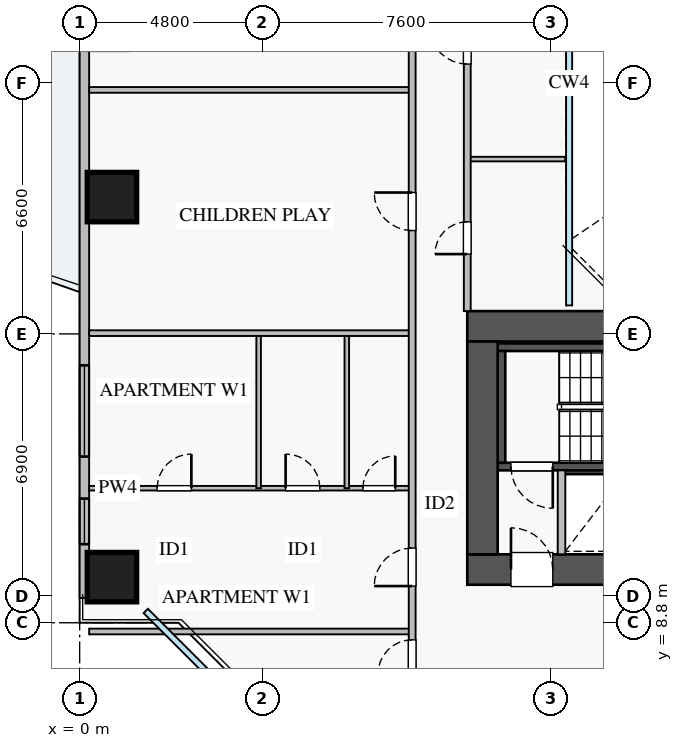
"""IFC4 building model, lengths in metres.
Left out: names, types, materials, properties, quantities, classifications, styles, units other than length and angle.
Written with IfcOpenShell. Run it as: python <this file> out.ifc"""

import sys

from ifc_helpers import new_model, si_unit, direction, frame, frame_2d, origin, origin_2d, place, context, subcontext, project, spatial, rectangle, extrude, source, transform, mapped, element, fill, save


model = new_model("IFC4")
c1 = context("Model", 3, precision=1e-05, world=origin(), true_north=direction((0.0, 1.0)))
c2 = subcontext(c1, "Body", "Model", "MODEL_VIEW")
j1 = project(units=[si_unit("LENGTHUNIT", "METRE"), si_unit("PLANEANGLEUNIT", "RADIAN")], contexts=[c1])
p1 = place(None, origin())
s1 = spatial("IfcSite", under=j1, at=p1, CompositionType="ELEMENT")
p2 = place(p1, origin())
s2 = spatial("IfcBuilding", under=s1, at=p2, CompositionType="ELEMENT")
p3 = place(p2, frame((0.0, 0.0, 66.5)))
s3 = spatial("IfcBuildingStorey", under=s2, at=p3, CompositionType="ELEMENT", Elevation=66.5)
p4 = place(p3, frame((12.68, 12.8, 0.0), z_axis=(0.0, 0.0, 1.0), x_axis=(1.0, 0.0, 0.0)))
e1 = element("IfcWall", 1, at=p4, inside=s3, PredefinedType="SHEAR", context=c2, shape_type="SweptSolid", body=[
    extrude(rectangle(XDim=1.94, YDim=0.18, at=frame_2d((0.97, 0.0))), origin(), (0.0, 0.0, 1.0), 3.07),
])
p5 = place(p3, frame((11.0, 12.91, 0.0), z_axis=(0.0, 0.0, 1.0), x_axis=(1.0, 0.0, 0.0)))
e2 = element("IfcWall", 2, at=p5, inside=s3, PredefinedType="SHEAR", context=c2, shape_type="SweptSolid", body=[
    extrude(rectangle(XDim=7.15, YDim=0.2, at=frame_2d((3.575, 0.0))), origin(), (0.0, 0.0, 1.0), 3.25),
])
p6 = place(p5, frame((0.35, 0.0, 0.0)))
e3 = element("IfcOpeningElement", 3, at=p6, cuts=e2, PredefinedType="OPENING", context=c2, shape_type="SweptSolid", body=[
    extrude(rectangle(XDim=1.1, YDim=2.05, at=frame_2d((0.55, 1.025))), frame((0.0, 0.11, 0.0), z_axis=(0.0, -1.0, 0.0), x_axis=(1.0, 0.0, 0.0)), (0.0, 0.0, 1.0), 0.22),
])
p7 = place(p3, frame((11.0, 16.05, 0.0), z_axis=(0.0, 0.0, 1.0), x_axis=(1.0, 0.0, 0.0)))
e4 = element("IfcWall", 4, at=p7, inside=s3, PredefinedType="SHEAR", context=c2, shape_type="SweptSolid", body=[
    extrude(rectangle(XDim=7.15, YDim=0.2, at=frame_2d((3.575, 0.0))), origin(), (0.0, 0.0, 1.0), 3.25),
])
p8 = place(p3, frame((11.1, 13.01, 0.0), z_axis=(0.0, 0.0, 1.0), x_axis=(0.0, 1.0, 0.0)))
e5 = element("IfcWall", 5, at=p8, inside=s3, PredefinedType="SHEAR", context=c2, shape_type="SweptSolid", body=[
    extrude(rectangle(XDim=2.94, YDim=0.2, at=frame_2d((1.47, 0.0))), origin(), (0.0, 0.0, 1.0), 3.25),
])
p9 = place(p3, frame((10.2, 10.2, 0.0), z_axis=(0.0, 0.0, 1.0), x_axis=(1.0, 0.0, 0.0)))
e6 = element("IfcWall", 6, at=p9, inside=s3, PredefinedType="SHEAR", context=c2, shape_type="SweptSolid", body=[
    extrude(rectangle(XDim=17.6, YDim=0.8, at=frame_2d((8.8, 0.0))), origin(), (0.0, 0.0, 1.0), 3.25),
])
p10 = place(p9, frame((1.15, 0.0, 0.0)))
e7 = element("IfcOpeningElement", 7, at=p10, cuts=e6, PredefinedType="OPENING", context=c2, shape_type="SweptSolid", body=[
    extrude(rectangle(XDim=1.1, YDim=2.05, at=frame_2d((0.55, 1.025))), frame((0.0, 0.41, 0.0), z_axis=(0.0, -1.0, 0.0), x_axis=(1.0, 0.0, 0.0)), (0.0, 0.0, 1.0), 0.82),
])
p11 = place(p9, frame((8.3, 0.0, 0.0)))
e8 = element("IfcOpeningElement", 8, at=p11, cuts=e6, PredefinedType="OPENING", context=c2, shape_type="SweptSolid", body=[
    extrude(rectangle(XDim=1.1, YDim=2.05, at=frame_2d((0.55, 1.025))), frame((0.0, 0.41, 0.0), z_axis=(0.0, -1.0, 0.0), x_axis=(1.0, 0.0, 0.0)), (0.0, 0.0, 1.0), 0.82),
])
p12 = place(p9, frame((10.05, 0.0, 0.0)))
e9 = element("IfcOpeningElement", 9, at=p12, cuts=e6, PredefinedType="OPENING", context=c2, shape_type="SweptSolid", body=[
    extrude(rectangle(XDim=1.1, YDim=2.05, at=frame_2d((0.55, 1.025))), frame((0.0, 0.41, 0.0), z_axis=(0.0, -1.0, 0.0), x_axis=(1.0, 0.0, 0.0)), (0.0, 0.0, 1.0), 0.82),
])
p13 = place(p9, frame((14.74, 0.0, 0.0)))
e10 = element("IfcOpeningElement", 10, at=p13, cuts=e6, PredefinedType="OPENING", context=c2, shape_type="SweptSolid", body=[
    extrude(rectangle(XDim=1.0, YDim=2.05, at=frame_2d((0.5, 1.025))), frame((0.0, 0.41, 0.0), z_axis=(0.0, -1.0, 0.0), x_axis=(1.0, 0.0, 0.0)), (0.0, 0.0, 1.0), 0.82),
])
p14 = place(p9, frame((11.945, 0.0, 0.0)))
e11 = element("IfcOpeningElement", 11, at=p14, cuts=e6, PredefinedType="OPENING", context=c2, shape_type="SweptSolid", body=[
    extrude(rectangle(XDim=1.0, YDim=2.05, at=frame_2d((0.5, 1.025))), frame((0.0, 0.41, 0.0), z_axis=(0.0, -1.0, 0.0), x_axis=(1.0, 0.0, 0.0)), (0.0, 0.0, 1.0), 0.82),
])
p15 = place(p9, frame((13.48, 0.0, 0.0)))
e12 = element("IfcOpeningElement", 12, at=p15, cuts=e6, PredefinedType="OPENING", context=c2, shape_type="SweptSolid", body=[
    extrude(rectangle(XDim=1.0, YDim=2.05, at=frame_2d((0.5, 1.025))), frame((0.0, 0.41, 0.0), z_axis=(0.0, -1.0, 0.0), x_axis=(1.0, 0.0, 0.0)), (0.0, 0.0, 1.0), 0.82),
])
p16 = place(p3, frame((10.2, 16.6, 0.0), z_axis=(0.0, 0.0, 1.0), x_axis=(1.0, 0.0, 0.0)))
e13 = element("IfcWall", 13, at=p16, inside=s3, PredefinedType="SHEAR", context=c2, shape_type="SweptSolid", body=[
    extrude(rectangle(XDim=17.6, YDim=0.8, at=frame_2d((8.8, 0.0))), origin(), (0.0, 0.0, 1.0), 3.25),
])
p17 = place(p3, frame((10.6, 10.6, 0.0), z_axis=(0.0, 0.0, 1.0), x_axis=(0.0, 1.0, 0.0)))
e14 = element("IfcWall", 14, at=p17, inside=s3, PredefinedType="SHEAR", context=c2, shape_type="SweptSolid", body=[
    extrude(rectangle(XDim=5.6, YDim=0.8, at=frame_2d((2.8, 0.0))), origin(), (0.0, 0.0, 1.0), 3.25),
])
m1 = source(origin(), c2, "Body", "SweptSolid", [
    extrude(rectangle(XDim=1.3, YDim=1.3, at=origin_2d()), origin(), (0.0, 0.0, 1.0), 3.25),
])
for number, where, z_axis, x_axis in (
    (15, (0.85, 20.0, 0.0), (0.0, 0.0, 1.0), (1.0, 0.0, 0.0)),
    (16, (0.85, 10.0, 0.0), (0.0, 0.0, 1.0), (1.0, 0.0, 0.0)),
):
    element("IfcColumn", number, at=place(p3, frame(where, z_axis=z_axis, x_axis=x_axis)), inside=s3, PredefinedType="COLUMN", context=c2, shape_type="MappedRepresentation", body=[
        mapped(m1, transform((0.0, 0.0, 0.0), x_axis=(1.0, 0.0, 0.0), y_axis=(0.0, 1.0, 0.0), z_axis=(0.0, 0.0, 1.0), scale=1.0)),
    ])
p18 = place(p3, frame((0.125, 9.45, 0.0), z_axis=(0.0, 0.0, 1.0), x_axis=(0.0, 1.0, 0.0)))
e17 = element("IfcWall", 17, at=p18, inside=s3, PredefinedType="STANDARD", context=c2, shape_type="SweptSolid", body=[
    extrude(rectangle(XDim=27.1, YDim=0.25, at=frame_2d((13.55, 0.0))), origin(), (0.0, 0.0, 1.0), 2.61),
])
p19 = place(p18, frame((14.4, 0.0, 0.0)))
e18 = element("IfcOpeningElement", 18, at=p19, cuts=e17, PredefinedType="OPENING", context=c2, shape_type="SweptSolid", body=[
    extrude(rectangle(XDim=1.2, YDim=2.1, at=frame_2d((0.6, 1.05))), frame((0.0, 0.135, 0.0), z_axis=(0.0, -1.0, 0.0), x_axis=(1.0, 0.0, 0.0)), (0.0, 0.0, 1.0), 0.27),
])
p20 = place(p18, frame((1.417, 0.0, 0.9)))
e19 = element("IfcOpeningElement", 19, at=p20, cuts=e17, PredefinedType="OPENING", context=c2, shape_type="SweptSolid", body=[
    extrude(rectangle(XDim=1.2, YDim=1.4, at=frame_2d((0.6, 0.7))), frame((0.0, 0.135, 0.0), z_axis=(0.0, -1.0, 0.0), x_axis=(1.0, 0.0, 0.0)), (0.0, 0.0, 1.0), 0.27),
])
p21 = place(p18, frame((24.188, 0.0, 0.9)))
e20 = element("IfcOpeningElement", 20, at=p21, cuts=e17, PredefinedType="OPENING", context=c2, shape_type="SweptSolid", body=[
    extrude(rectangle(XDim=1.5, YDim=1.5, at=frame_2d((0.75, 0.75))), frame((0.0, 0.135, 0.0), z_axis=(0.0, -1.0, 0.0), x_axis=(1.0, 0.0, 0.0)), (0.0, 0.0, 1.0), 0.27),
])
p22 = place(p18, frame((3.722, 0.0, 0.9)))
e21 = element("IfcOpeningElement", 21, at=p22, cuts=e17, PredefinedType="OPENING", context=c2, shape_type="SweptSolid", body=[
    extrude(rectangle(XDim=2.4, YDim=1.5, at=frame_2d((1.2, 0.75))), frame((0.0, 0.135, 0.0), z_axis=(0.0, -1.0, 0.0), x_axis=(1.0, 0.0, 0.0)), (0.0, 0.0, 1.0), 0.27),
])
p23 = place(p18, frame((21.018, 0.0, 0.9)))
e22 = element("IfcOpeningElement", 22, at=p23, cuts=e17, PredefinedType="OPENING", context=c2, shape_type="SweptSolid", body=[
    extrude(rectangle(XDim=2.4, YDim=1.5, at=frame_2d((1.2, 0.75))), frame((0.0, 0.135, 0.0), z_axis=(0.0, -1.0, 0.0), x_axis=(1.0, 0.0, 0.0)), (0.0, 0.0, 1.0), 0.27),
])
p24 = place(p18, frame((18.6, 0.0, 0.9)))
e23 = element("IfcOpeningElement", 23, at=p24, cuts=e17, PredefinedType="OPENING", context=c2, shape_type="SweptSolid", body=[
    extrude(rectangle(XDim=0.9, YDim=1.2, at=frame_2d((0.45, 0.6))), frame((0.0, 0.135, 0.0), z_axis=(0.0, -1.0, 0.0), x_axis=(1.0, 0.0, 0.0)), (0.0, 0.0, 1.0), 0.27),
])
p25 = place(p3, frame((12.68, 10.6, 0.0), z_axis=(0.0, 0.0, 1.0), x_axis=(0.0, 1.0, 0.0)))
e24 = element("IfcWall", 24, at=p25, inside=s3, PredefinedType="PARTITIONING", context=c2, shape_type="SweptSolid", body=[
    extrude(rectangle(XDim=2.21, YDim=0.2, at=frame_2d((1.105, 0.0))), origin(), (0.0, 0.0, 1.0), 3.07),
])
p26 = place(p3, frame((0.25, 8.57, 0.0), z_axis=(0.0, 0.0, 1.0), x_axis=(1.0, 0.0, 0.0)))
e25 = element("IfcWall", 25, at=p26, inside=s3, PredefinedType="PARTITIONING", context=c2, shape_type="SweptSolid", body=[
    extrude(rectangle(XDim=8.5, YDim=0.15, at=frame_2d((4.25, 0.0))), origin(), (0.0, 0.0, 1.0), 3.07),
])
p27 = place(p3, frame((0.25, 12.34, 0.0), z_axis=(0.0, 0.0, 1.0), x_axis=(1.0, 0.0, 0.0)))
e26 = element("IfcWall", 26, at=p27, inside=s3, PredefinedType="PLUMBINGWALL", context=c2, shape_type="SweptSolid", body=[
    extrude(rectangle(XDim=8.5, YDim=0.12, at=frame_2d((4.25, 0.0))), origin(), (0.0, 0.0, 1.0), 3.07),
])
p28 = place(p27, frame((1.79, 0.0, 0.0)))
e27 = element("IfcOpeningElement", 27, at=p28, cuts=e26, PredefinedType="OPENING", context=c2, shape_type="SweptSolid", body=[
    extrude(rectangle(XDim=0.9, YDim=2.05, at=frame_2d((0.45, 1.025))), frame((0.0, 0.07, 0.0), z_axis=(0.0, -1.0, 0.0), x_axis=(1.0, 0.0, 0.0)), (0.0, 0.0, 1.0), 0.14),
])
p29 = place(p27, frame((5.17, 0.0, 0.0)))
e28 = element("IfcOpeningElement", 28, at=p29, cuts=e26, PredefinedType="OPENING", context=c2, shape_type="SweptSolid", body=[
    extrude(rectangle(XDim=0.9, YDim=2.05, at=frame_2d((0.45, 1.025))), frame((0.0, 0.07, 0.0), z_axis=(0.0, -1.0, 0.0), x_axis=(1.0, 0.0, 0.0)), (0.0, 0.0, 1.0), 0.14),
])
p30 = place(p27, frame((7.205, 0.0, 0.0)))
e29 = element("IfcOpeningElement", 29, at=p30, cuts=e26, PredefinedType="OPENING", context=c2, shape_type="SweptSolid", body=[
    extrude(rectangle(XDim=0.85, YDim=2.05, at=frame_2d((0.425, 1.025))), frame((0.0, 0.07, 0.0), z_axis=(0.0, -1.0, 0.0), x_axis=(1.0, 0.0, 0.0)), (0.0, 0.0, 1.0), 0.14),
])
for number, where, z_axis, x_axis in (
    (30, (4.71, 12.34, 0.0), (0.0, 0.0, 1.0), (0.0, 1.0, 0.0)),
    (31, (7.03, 12.34, 0.0), (0.0, 0.0, 1.0), (0.0, 1.0, 0.0)),
):
    element("IfcWall", number, at=place(p3, frame(where, z_axis=z_axis, x_axis=x_axis)), inside=s3, PredefinedType="PLUMBINGWALL", context=c2, shape_type="SweptSolid", body=[
        extrude(rectangle(XDim=4.08, YDim=0.12, at=frame_2d((2.04, 0.0))), origin(), (0.0, 0.0, 1.0), 3.07),
    ])
for number, where, z_axis, x_axis in (
    (32, (0.25, 16.42, 0.0), (0.0, 0.0, 1.0), (1.0, 0.0, 0.0)),
    (33, (0.25, 22.82, 0.0), (0.0, 0.0, 1.0), (1.0, 0.0, 0.0)),
):
    element("IfcWall", number, at=place(p3, frame(where, z_axis=z_axis, x_axis=x_axis)), inside=s3, PredefinedType="PARTITIONING", context=c2, shape_type="SweptSolid", body=[
        extrude(rectangle(XDim=8.5, YDim=0.15, at=frame_2d((4.25, 0.0))), origin(), (0.0, 0.0, 1.0), 3.07),
    ])
p31 = place(p3, frame((8.75, 7.21, 0.0), z_axis=(0.0, 0.0, 1.0), x_axis=(0.0, 1.0, 0.0)))
e34 = element("IfcWall", 34, at=p31, inside=s3, PredefinedType="PARTITIONING", context=c2, shape_type="SweptSolid", body=[
    extrude(rectangle(XDim=31.23, YDim=0.18, at=frame_2d((15.615, 0.0))), origin(), (0.0, 0.0, 1.0), 3.07),
])
p32 = place(p31, frame((30.09, 0.0, 0.0)))
e35 = element("IfcOpeningElement", 35, at=p32, cuts=e34, PredefinedType="OPENING", context=c2, shape_type="SweptSolid", body=[
    extrude(rectangle(XDim=0.9, YDim=2.05, at=frame_2d((0.45, 1.025))), frame((0.0, 0.1, 0.0), z_axis=(0.0, -1.0, 0.0), x_axis=(1.0, 0.0, 0.0)), (0.0, 0.0, 1.0), 0.2),
])
p33 = place(p31, frame((0.24, 0.0, 0.0)))
e36 = element("IfcOpeningElement", 36, at=p33, cuts=e34, PredefinedType="OPENING", context=c2, shape_type="SweptSolid", body=[
    extrude(rectangle(XDim=0.9, YDim=2.05, at=frame_2d((0.45, 1.025))), frame((0.0, 0.1, 0.0), z_axis=(0.0, -1.0, 0.0), x_axis=(1.0, 0.0, 0.0)), (0.0, 0.0, 1.0), 0.2),
])
p34 = place(p31, frame((2.555, 0.0, 0.0)))
e37 = element("IfcOpeningElement", 37, at=p34, cuts=e34, PredefinedType="OPENING", context=c2, shape_type="SweptSolid", body=[
    extrude(rectangle(XDim=1.0, YDim=2.05, at=frame_2d((0.5, 1.025))), frame((0.0, 0.1, 0.0), z_axis=(0.0, -1.0, 0.0), x_axis=(1.0, 0.0, 0.0)), (0.0, 0.0, 1.0), 0.2),
])
p35 = place(p31, frame((11.91, 0.0, 0.0)))
e38 = element("IfcOpeningElement", 38, at=p35, cuts=e34, PredefinedType="OPENING", context=c2, shape_type="SweptSolid", body=[
    extrude(rectangle(XDim=1.0, YDim=2.05, at=frame_2d((0.5, 1.025))), frame((0.0, 0.1, 0.0), z_axis=(0.0, -1.0, 0.0), x_axis=(1.0, 0.0, 0.0)), (0.0, 0.0, 1.0), 0.2),
])
p36 = place(p31, frame((17.425, 0.0, 0.0)))
e39 = element("IfcOpeningElement", 39, at=p36, cuts=e34, PredefinedType="OPENING", context=c2, shape_type="SweptSolid", body=[
    extrude(rectangle(XDim=1.0, YDim=2.05, at=frame_2d((0.5, 1.025))), frame((0.0, 0.1, 0.0), z_axis=(0.0, -1.0, 0.0), x_axis=(1.0, 0.0, 0.0)), (0.0, 0.0, 1.0), 0.2),
])
p37 = place(p31, frame((23.76, 0.0, 0.0)))
e40 = element("IfcOpeningElement", 40, at=p37, cuts=e34, PredefinedType="OPENING", context=c2, shape_type="SweptSolid", body=[
    extrude(rectangle(XDim=1.0, YDim=2.05, at=frame_2d((0.5, 1.025))), frame((0.0, 0.1, 0.0), z_axis=(0.0, -1.0, 0.0), x_axis=(1.0, 0.0, 0.0)), (0.0, 0.0, 1.0), 0.2),
])
p38 = place(p3, frame((10.2, 21.0, 0.0), z_axis=(0.0, 0.0, 1.0), x_axis=(1.0, 0.0, 0.0)))
e41 = element("IfcWall", 41, at=p38, inside=s3, PredefinedType="PLUMBINGWALL", context=c2, shape_type="SweptSolid", body=[
    extrude(rectangle(XDim=2.58, YDim=0.12, at=frame_2d((1.29, 0.0))), origin(), (0.0, 0.0, 1.0), 3.07),
])
p39 = place(p3, frame((10.2, 17.0, 0.0), z_axis=(0.0, 0.0, 1.0), x_axis=(0.0, 1.0, 0.0)))
e42 = element("IfcWall", 42, at=p39, inside=s3, PredefinedType="PARTITIONING", context=c2, shape_type="SweptSolid", body=[
    extrude(rectangle(XDim=12.0, YDim=0.18, at=frame_2d((6.0, 0.0))), origin(), (0.0, 0.0, 1.0), 3.07),
])
p40 = place(p39, frame((1.5, 0.0, 0.0)))
e43 = element("IfcOpeningElement", 43, at=p40, cuts=e42, PredefinedType="OPENING", context=c2, shape_type="SweptSolid", body=[
    extrude(rectangle(XDim=0.85, YDim=2.05, at=frame_2d((0.425, 1.025))), frame((0.0, 0.1, 0.0), z_axis=(0.0, -1.0, 0.0), x_axis=(1.0, 0.0, 0.0)), (0.0, 0.0, 1.0), 0.2),
])
p41 = place(p39, frame((6.5, 0.0, 0.0)))
e44 = element("IfcOpeningElement", 44, at=p41, cuts=e42, PredefinedType="OPENING", context=c2, shape_type="SweptSolid", body=[
    extrude(rectangle(XDim=1.0, YDim=2.05, at=frame_2d((0.5, 1.025))), frame((0.0, 0.1, 0.0), z_axis=(0.0, -1.0, 0.0), x_axis=(1.0, 0.0, 0.0)), (0.0, 0.0, 1.0), 0.2),
])
m2 = source(origin(), c2, "Body", "SweptSolid", [
    extrude(rectangle(XDim=1.2, YDim=1.4, at=frame_2d((0.6, 0.7))), frame((0.0, 0.03, 0.0), z_axis=(0.0, -1.0, 0.0), x_axis=(1.0, 0.0, 0.0)), (0.0, 0.0, 1.0), 0.06),
])
p42 = place(p20, origin())
e45 = element("IfcWindow", 45, at=p42, inside=s3, PartitioningType="TRIPLE_PANEL_VERTICAL", PredefinedType="WINDOW", context=c2, shape_type="MappedRepresentation", body=[
    mapped(m2, transform((0.0, 0.0, 0.0), x_axis=(1.0, 0.0, 0.0), y_axis=(0.0, 1.0, 0.0), z_axis=(0.0, 0.0, 1.0), scale=1.0)),
])
fill(e19, e45)
m3 = source(origin(), c2, "Body", "SweptSolid", [
    extrude(rectangle(XDim=1.1, YDim=2.05, at=frame_2d((0.55, 1.025))), frame((0.0, 0.025, 0.0), z_axis=(0.0, -1.0, 0.0), x_axis=(1.0, 0.0, 0.0)), (0.0, 0.0, 1.0), 0.05),
])
p43 = place(p10, origin())
e46 = element("IfcDoor", 46, at=p43, inside=s3, OperationType="SINGLE_SWING_LEFT", PredefinedType="DOOR", context=c2, shape_type="MappedRepresentation", body=[
    mapped(m3, transform((0.0, 0.0, 0.0), x_axis=(1.0, 0.0, 0.0), y_axis=(0.0, 1.0, 0.0), z_axis=(0.0, 0.0, 1.0), scale=1.0)),
])
fill(e7, e46)
p44 = place(p6, frame((1.1, 0.0, 0.0), z_axis=(0.0, 0.0, 1.0), x_axis=(-1.0, 0.0, 0.0)))
e47 = element("IfcDoor", 47, at=p44, inside=s3, OperationType="SINGLE_SWING_RIGHT", PredefinedType="DOOR", context=c2, shape_type="MappedRepresentation", body=[
    mapped(m3, transform((0.0, 0.0, 0.0), x_axis=(1.0, 0.0, 0.0), y_axis=(0.0, 1.0, 0.0), z_axis=(0.0, 0.0, 1.0), scale=1.0)),
])
fill(e3, e47)
m4 = source(origin(), c2, "Body", "SweptSolid", [
    extrude(rectangle(XDim=0.9, YDim=2.05, at=frame_2d((0.45, 1.025))), frame((0.0, 0.025, 0.0), z_axis=(0.0, -1.0, 0.0), x_axis=(1.0, 0.0, 0.0)), (0.0, 0.0, 1.0), 0.05),
])
p45 = place(p28, origin())
e48 = element("IfcDoor", 48, at=p45, inside=s3, OperationType="SINGLE_SWING_RIGHT", PredefinedType="DOOR", context=c2, shape_type="MappedRepresentation", body=[
    mapped(m4, transform((0.0, 0.0, 0.0), x_axis=(1.0, 0.0, 0.0), y_axis=(0.0, 1.0, 0.0), z_axis=(0.0, 0.0, 1.0), scale=1.0)),
])
fill(e27, e48)
p46 = place(p29, origin())
e49 = element("IfcDoor", 49, at=p46, inside=s3, OperationType="SINGLE_SWING_LEFT", PredefinedType="DOOR", context=c2, shape_type="MappedRepresentation", body=[
    mapped(m4, transform((0.0, 0.0, 0.0), x_axis=(1.0, 0.0, 0.0), y_axis=(0.0, 1.0, 0.0), z_axis=(0.0, 0.0, 1.0), scale=1.0)),
])
fill(e28, e49)
m5 = source(origin(), c2, "Body", "SweptSolid", [
    extrude(rectangle(XDim=0.85, YDim=2.05, at=frame_2d((0.425, 1.025))), frame((0.0, 0.025, 0.0), z_axis=(0.0, -1.0, 0.0), x_axis=(1.0, 0.0, 0.0)), (0.0, 0.0, 1.0), 0.05),
])
p47 = place(p30, origin())
e50 = element("IfcDoor", 50, at=p47, inside=s3, OperationType="SINGLE_SWING_RIGHT", PredefinedType="DOOR", context=c2, shape_type="MappedRepresentation", body=[
    mapped(m5, transform((0.0, 0.0, 0.0), x_axis=(1.0, 0.0, 0.0), y_axis=(0.0, 1.0, 0.0), z_axis=(0.0, 0.0, 1.0), scale=1.0)),
])
fill(e29, e50)
p48 = place(p33, origin())
e51 = element("IfcDoor", 51, at=p48, inside=s3, OperationType="SINGLE_SWING_LEFT", PredefinedType="DOOR", context=c2, shape_type="MappedRepresentation", body=[
    mapped(m4, transform((0.0, 0.0, 0.0), x_axis=(1.0, 0.0, 0.0), y_axis=(0.0, 1.0, 0.0), z_axis=(0.0, 0.0, 1.0), scale=1.0)),
])
fill(e36, e51)
m6 = source(origin(), c2, "Body", "SweptSolid", [
    extrude(rectangle(XDim=1.0, YDim=2.05, at=frame_2d((0.5, 1.025))), frame((0.0, 0.025, 0.0), z_axis=(0.0, -1.0, 0.0), x_axis=(1.0, 0.0, 0.0)), (0.0, 0.0, 1.0), 0.05),
])
p49 = place(p34, origin())
e52 = element("IfcDoor", 52, at=p49, inside=s3, OperationType="SINGLE_SWING_LEFT", PredefinedType="DOOR", context=c2, shape_type="MappedRepresentation", body=[
    mapped(m6, transform((0.0, 0.0, 0.0), x_axis=(1.0, 0.0, 0.0), y_axis=(0.0, 1.0, 0.0), z_axis=(0.0, 0.0, 1.0), scale=1.0)),
])
fill(e37, e52)
p50 = place(p35, origin())
e53 = element("IfcDoor", 53, at=p50, inside=s3, OperationType="SINGLE_SWING_RIGHT", PredefinedType="DOOR", context=c2, shape_type="MappedRepresentation", body=[
    mapped(m6, transform((0.0, 0.0, 0.0), x_axis=(1.0, 0.0, 0.0), y_axis=(0.0, 1.0, 0.0), z_axis=(0.0, 0.0, 1.0), scale=1.0)),
])
fill(e38, e53)
p51 = place(p40, origin())
e54 = element("IfcDoor", 54, at=p51, inside=s3, OperationType="SINGLE_SWING_LEFT", PredefinedType="DOOR", context=c2, shape_type="MappedRepresentation", body=[
    mapped(m5, transform((0.0, 0.0, 0.0), x_axis=(1.0, 0.0, 0.0), y_axis=(0.0, 1.0, 0.0), z_axis=(0.0, 0.0, 1.0), scale=1.0)),
])
fill(e43, e54)
p52 = place(p41, origin())
e55 = element("IfcDoor", 55, at=p52, inside=s3, OperationType="SINGLE_SWING_RIGHT", PredefinedType="DOOR", context=c2, shape_type="MappedRepresentation", body=[
    mapped(m6, transform((0.0, 0.0, 0.0), x_axis=(1.0, 0.0, 0.0), y_axis=(0.0, 1.0, 0.0), z_axis=(0.0, 0.0, 1.0), scale=1.0)),
])
fill(e44, e55)
m7 = source(origin(), c2, "Body", "SweptSolid", [
    extrude(rectangle(XDim=2.4, YDim=1.5, at=frame_2d((1.2, 0.75))), frame((0.0, 0.03, 0.0), z_axis=(0.0, -1.0, 0.0), x_axis=(1.0, 0.0, 0.0)), (0.0, 0.0, 1.0), 0.06),
])
p53 = place(p22, origin())
e56 = element("IfcWindow", 56, at=p53, inside=s3, PartitioningType="TRIPLE_PANEL_VERTICAL", PredefinedType="WINDOW", context=c2, shape_type="MappedRepresentation", body=[
    mapped(m7, transform((0.0, 0.0, 0.0), x_axis=(1.0, 0.0, 0.0), y_axis=(0.0, 1.0, 0.0), z_axis=(0.0, 0.0, 1.0), scale=1.0)),
])
fill(e21, e56)
save(model, sys.argv[1])
